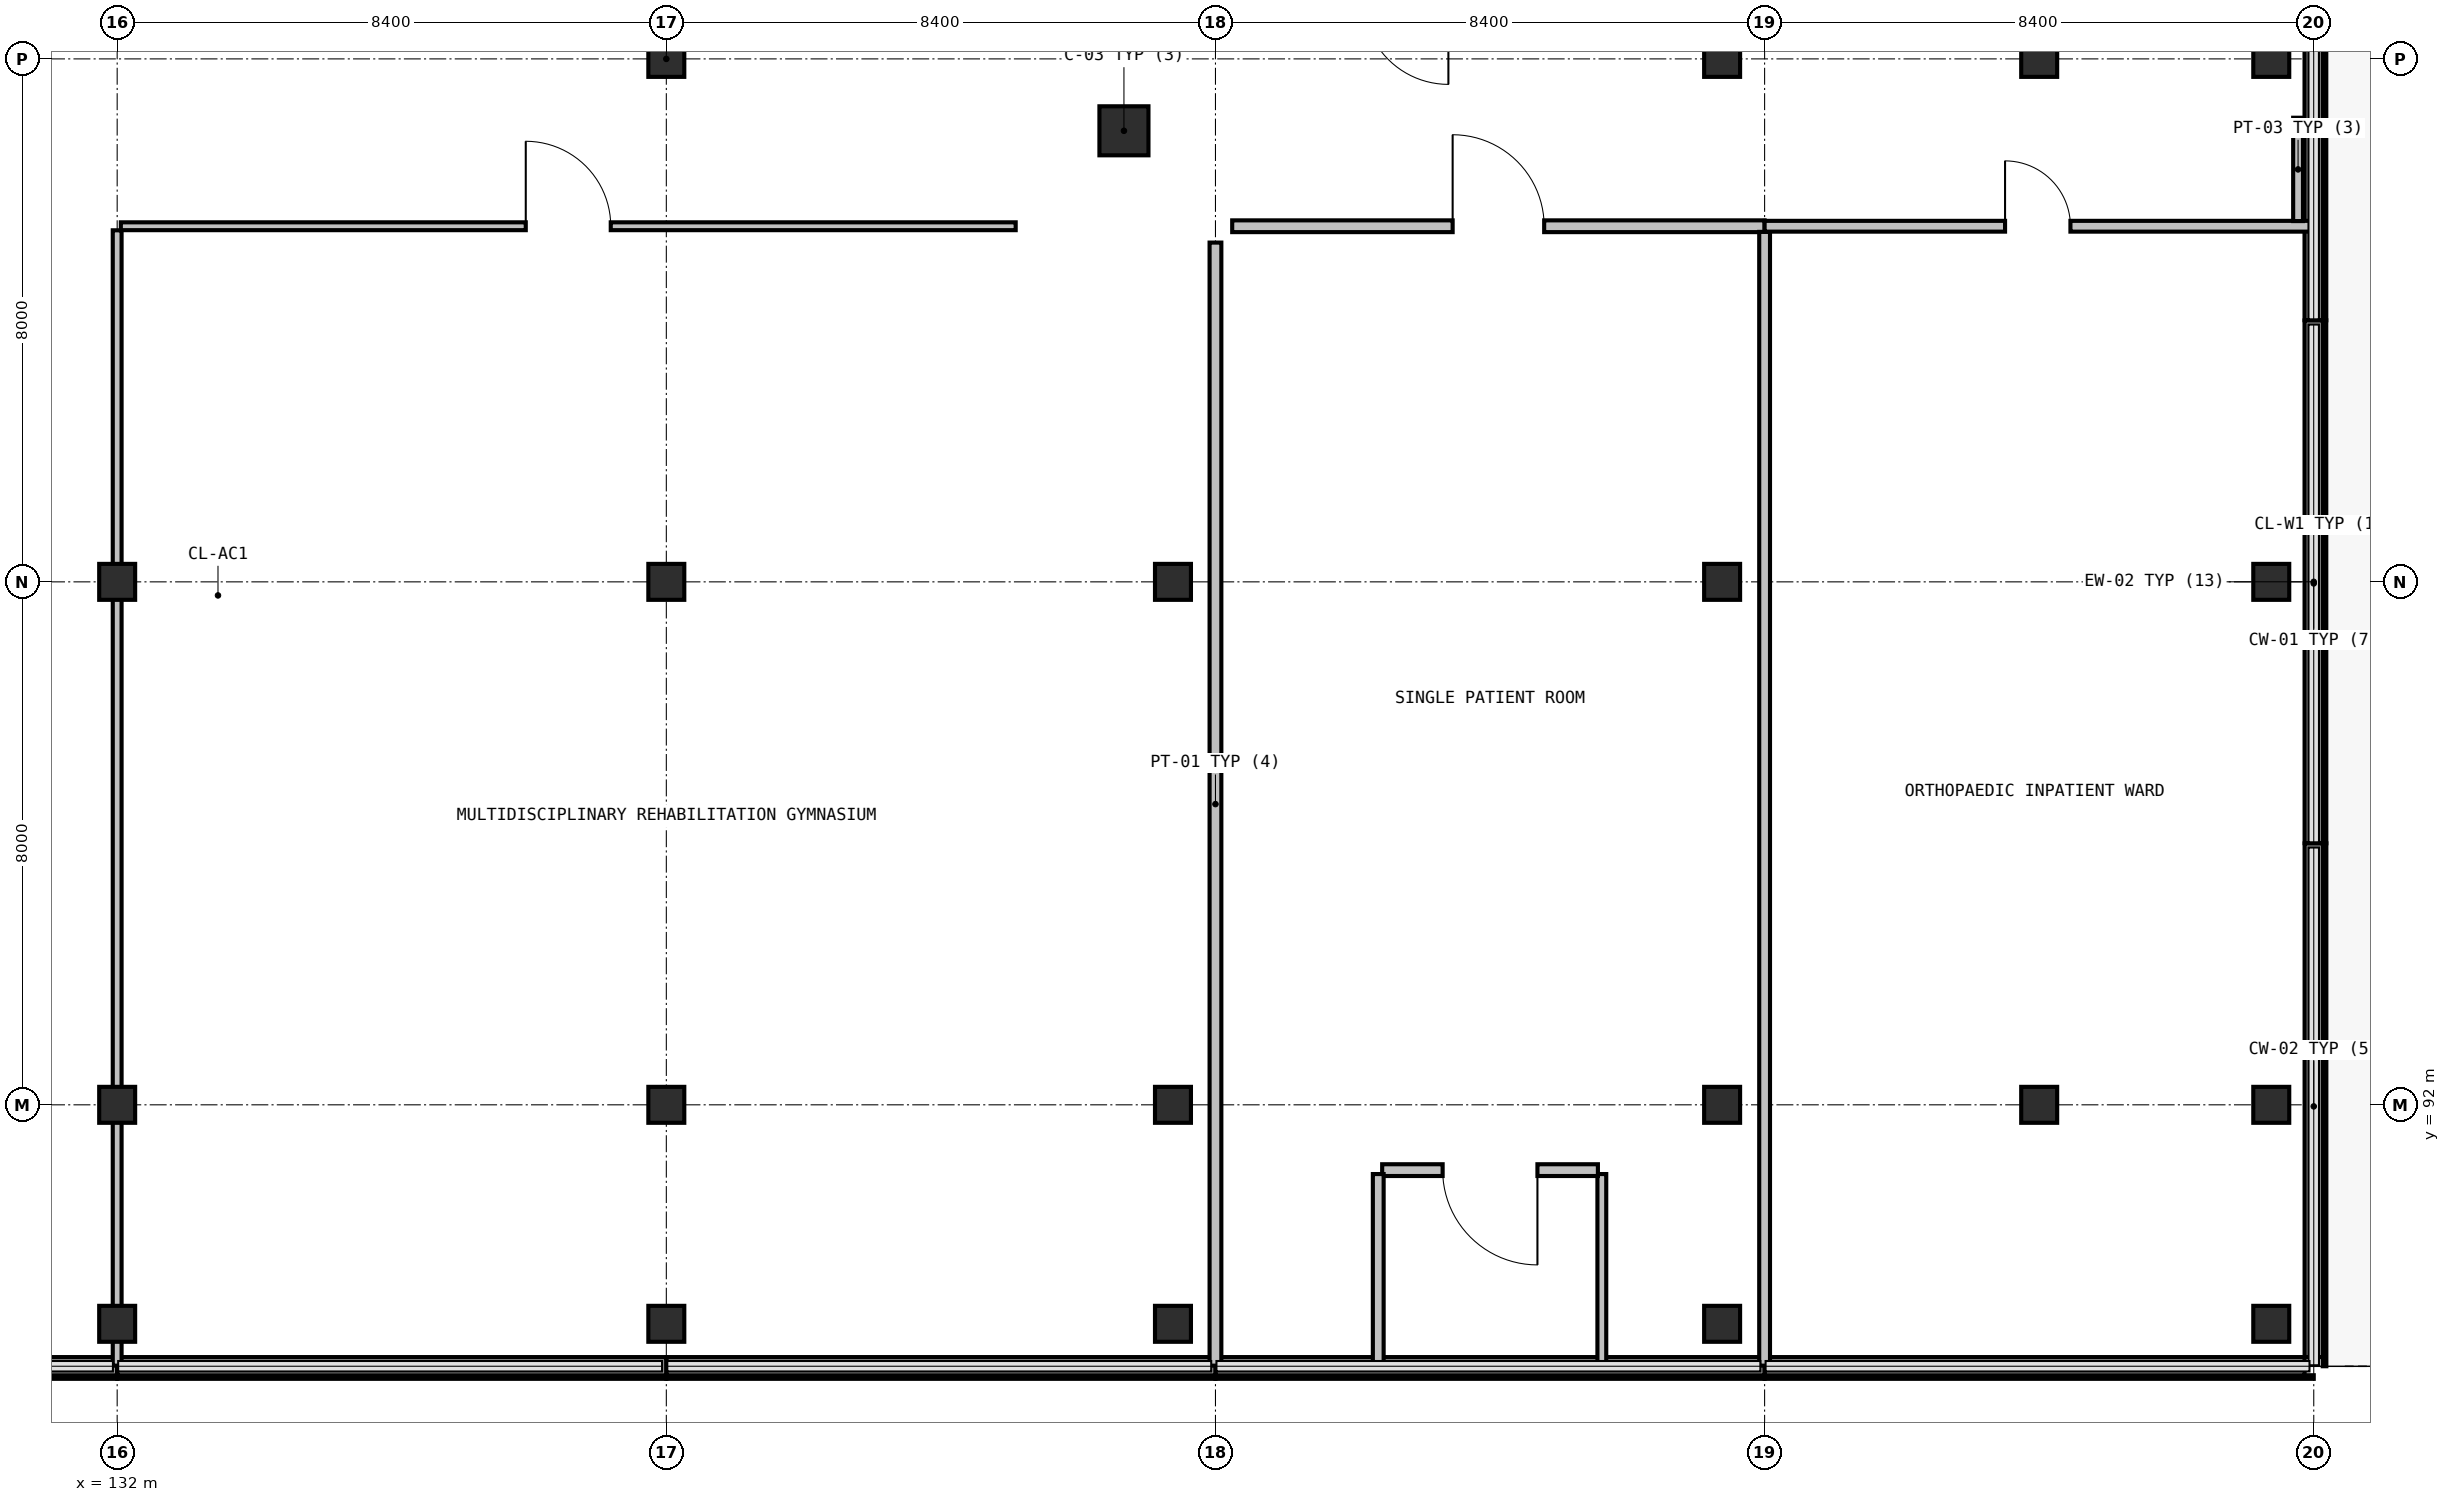
"""IFC4 building model, lengths in metres.
Left out: names, types, materials, properties, quantities, classifications, styles, units other than length and angle.
Written with IfcOpenShell. Run it as: python <this file> out.ifc"""

import sys

from ifc_helpers import new_model, si_unit, direction, frame, frame_2d, origin, origin_2d, place, context, subcontext, project, spatial, rectangle, extrude, element, fill, save


model = new_model("IFC4")
c1 = context("Model", 3, precision=1e-05, world=origin(), true_north=direction((0.0, 1.0)))
c2 = subcontext(c1, "Body", "Model", "MODEL_VIEW")
j1 = project(units=[si_unit("LENGTHUNIT", "METRE"), si_unit("PLANEANGLEUNIT", "RADIAN")], contexts=[c1])
p1 = place(None, origin())
s1 = spatial("IfcSite", under=j1, at=p1, CompositionType="ELEMENT")
p2 = place(p1, origin())
s2 = spatial("IfcBuilding", under=s1, at=p2, CompositionType="ELEMENT")
p3 = place(p2, frame((0.0, 0.0, 31.35)))
s3 = spatial("IfcBuildingStorey", under=s2, at=p3, CompositionType="ELEMENT", Elevation=31.35)
p4 = place(p3, frame((147.4, 106.9, 0.0), z_axis=(0.0, 0.0, 1.0), x_axis=(1.0, 0.0, 0.0)))
e1 = element("IfcColumn", 1, at=p4, inside=s3, PredefinedType="COLUMN", context=c2, shape_type="SweptSolid", body=[
    extrude(rectangle(XDim=0.75, YDim=0.75, at=origin_2d()), origin(), (0.0, 0.0, 1.0), 4.05),
])
for number, where, z_axis, x_axis in (
    (2, (161.4, 92.0, 0.0), (0.0, 0.0, 1.0), (1.0, 0.0, 0.0)),
    (3, (161.4, 108.0, 0.0), (0.0, 0.0, 1.0), (1.0, 0.0, 0.0)),
):
    element("IfcColumn", number, at=place(p3, frame(where, z_axis=z_axis, x_axis=x_axis)), inside=s3, PredefinedType="COLUMN", context=c2, shape_type="SweptSolid", body=[
        extrude(rectangle(XDim=0.55, YDim=0.55, at=origin_2d()), origin(), (0.0, 0.0, 1.0), 3.778),
    ])
for number, where, z_axis, x_axis in (
    (4, (132.0, 88.65, 0.0), (0.0, 0.0, 1.0), (1.0, 0.0, 0.0)),
    (5, (132.0, 92.0, 0.0), (0.0, 0.0, 1.0), (1.0, 0.0, 0.0)),
    (6, (132.0, 100.0, 0.0), (0.0, 0.0, 1.0), (1.0, 0.0, 0.0)),
    (7, (140.4, 88.65, 0.0), (0.0, 0.0, 1.0), (1.0, 0.0, 0.0)),
    (8, (140.4, 92.0, 0.0), (0.0, 0.0, 1.0), (1.0, 0.0, 0.0)),
    (9, (140.4, 100.0, 0.0), (0.0, 0.0, 1.0), (1.0, 0.0, 0.0)),
    (10, (140.4, 108.0, 0.0), (0.0, 0.0, 1.0), (1.0, 0.0, 0.0)),
    (11, (148.15, 88.65, 0.0), (0.0, 0.0, 1.0), (1.0, 0.0, 0.0)),
    (12, (148.15, 92.0, 0.0), (0.0, 0.0, 1.0), (1.0, 0.0, 0.0)),
    (13, (148.15, 100.0, 0.0), (0.0, 0.0, 1.0), (1.0, 0.0, 0.0)),
    (14, (156.55, 88.65, 0.0), (0.0, 0.0, 1.0), (1.0, 0.0, 0.0)),
    (15, (156.55, 92.0, 0.0), (0.0, 0.0, 1.0), (1.0, 0.0, 0.0)),
    (16, (156.55, 100.0, 0.0), (0.0, 0.0, 1.0), (1.0, 0.0, 0.0)),
    (17, (156.55, 108.0, 0.0), (0.0, 0.0, 1.0), (1.0, 0.0, 0.0)),
):
    element("IfcColumn", number, at=place(p3, frame(where, z_axis=z_axis, x_axis=x_axis)), inside=s3, PredefinedType="COLUMN", context=c2, shape_type="SweptSolid", body=[
        extrude(rectangle(XDim=0.55, YDim=0.55, at=origin_2d()), origin(), (0.0, 0.0, 1.0), 4.05),
    ])
for number, where, z_axis, x_axis in (
    (18, (164.95, 88.65, 0.0), (0.0, 0.0, 1.0), (1.0, 0.0, 0.0)),
    (19, (164.95, 92.0, 0.0), (0.0, 0.0, 1.0), (1.0, 0.0, 0.0)),
    (20, (164.95, 100.0, 0.0), (0.0, 0.0, 1.0), (1.0, 0.0, 0.0)),
    (21, (164.95, 108.0, 0.0), (0.0, 0.0, 1.0), (1.0, 0.0, 0.0)),
):
    element("IfcColumn", number, at=place(p3, frame(where, z_axis=z_axis, x_axis=x_axis)), inside=s3, PredefinedType="COLUMN", context=c2, shape_type="SweptSolid", body=[
        extrude(rectangle(XDim=0.55, YDim=0.55, at=origin_2d()), origin(), (0.0, 0.0, 1.0), 3.778),
    ])
p5 = place(p3, frame((165.599, 111.998, 0.0), z_axis=(0.0, 0.0, 1.0), x_axis=(0.0, -1.0, 0.0)))
e22 = element("IfcWall", 22, at=p5, inside=s3, PredefinedType="SOLIDWALL", context=c2, shape_type="SweptSolid", body=[
    extrude(rectangle(XDim=7.995, YDim=0.28, at=frame_2d((3.998, 0.0))), origin(), (0.0, 0.0, 1.0), 0.94),
])
p6 = place(p3, frame((165.599, 103.999, 0.0), z_axis=(0.0, 0.0, 1.0), x_axis=(0.000122129945, -0.999999992542, 0.0)))
e23 = element("IfcWall", 23, at=p6, inside=s3, PredefinedType="SOLIDWALL", context=c2, shape_type="SweptSolid", body=[
    extrude(rectangle(XDim=7.996, YDim=0.28, at=frame_2d((3.998, 0.0))), origin(), (0.0, 0.0, 1.0), 0.94),
])
p7 = place(p3, frame((165.6, 95.999, 0.0), z_axis=(0.0, 0.0, 1.0), x_axis=(0.0, -1.0, 0.0)))
e24 = element("IfcWall", 24, at=p7, inside=s3, PredefinedType="SOLIDWALL", context=c2, shape_type="SweptSolid", body=[
    extrude(rectangle(XDim=7.858, YDim=0.28, at=frame_2d((3.929, 0.0))), origin(), (0.0, 0.0, 1.0), 0.94),
])
p8 = place(p3, frame((165.46, 88.001, 0.0), z_axis=(0.0, 0.0, 1.0), x_axis=(-1.0, 0.0, 0.0)))
e25 = element("IfcWall", 25, at=p8, inside=s3, PredefinedType="SOLIDWALL", context=c2, shape_type="SweptSolid", body=[
    extrude(rectangle(XDim=8.258, YDim=0.28, at=frame_2d((4.129, 0.0))), origin(), (0.0, 0.0, 1.0), 0.94),
])
for number, where, z_axis, x_axis in (
    (26, (157.198, 88.001, 0.0), (0.0, 0.0, 1.0), (-1.0, 0.0, 0.0)),
    (27, (148.798, 88.001, 0.0), (0.0, 0.0, 1.0), (-1.0, 0.0, 0.0)),
    (28, (140.398, 88.001, 0.0), (0.0, 0.0, 1.0), (-1.0, 0.0, 0.0)),
    (29, (131.998, 88.001, 0.0), (0.0, 0.0, 1.0), (-1.0, 0.0, 0.0)),
):
    element("IfcWall", number, at=place(p3, frame(where, z_axis=z_axis, x_axis=x_axis)), inside=s3, PredefinedType="SOLIDWALL", context=c2, shape_type="SweptSolid", body=[
        extrude(rectangle(XDim=8.396, YDim=0.28, at=frame_2d((4.198, 0.0))), origin(), (0.0, 0.0, 1.0), 0.94),
    ])
p9 = place(p3, frame((132.0, 105.378, 0.0), z_axis=(0.0, 0.0, 1.0), x_axis=(0.0, -1.0, 0.0)))
e30 = element("IfcWall", 30, at=p9, inside=s3, PredefinedType="PARTITIONING", context=c2, shape_type="SweptSolid", body=[
    extrude(rectangle(XDim=17.368, YDim=0.135, at=frame_2d((8.684, 0.0))), origin(), (0.0, 0.0, 1.0), 3.185),
])
p10 = place(p3, frame((132.056, 105.44, 0.0), z_axis=(0.0, 0.0, 1.0), x_axis=(1.0, 0.0, 0.0)))
e31 = element("IfcWall", 31, at=p10, inside=s3, PredefinedType="PARTITIONING", context=c2, shape_type="SweptSolid", body=[
    extrude(rectangle(XDim=13.688, YDim=0.12, at=frame_2d((6.844, 0.0))), origin(), (0.0, 0.0, 1.0), 3.785),
])
p11 = place(p10, frame((6.194, 0.0, 0.0)))
e32 = element("IfcOpeningElement", 32, at=p11, cuts=e31, PredefinedType="OPENING", context=c2, shape_type="SweptSolid", body=[
    extrude(rectangle(XDim=1.3, YDim=2.15, at=frame_2d((0.65, 1.075))), frame((0.0, 0.07, 0.0), z_axis=(0.0, -1.0, 0.0), x_axis=(1.0, 0.0, 0.0)), (0.0, 0.0, 1.0), 0.14),
])
p12 = place(p3, frame((148.8, 105.19, 0.0), z_axis=(0.0, 0.0, 1.0), x_axis=(0.0, -1.0, 0.0)))
e33 = element("IfcWall", 33, at=p12, inside=s3, PredefinedType="PARTITIONING", context=c2, shape_type="SweptSolid", body=[
    extrude(rectangle(XDim=17.18, YDim=0.18, at=frame_2d((8.59, 0.0))), origin(), (0.0, 0.0, 1.0), 3.785),
])
p13 = place(p3, frame((149.056, 105.44, 0.0), z_axis=(0.0, 0.0, 1.0), x_axis=(1.0, 0.0, 0.0)))
e34 = element("IfcWall", 34, at=p13, inside=s3, PredefinedType="PARTITIONING", context=c2, shape_type="SweptSolid", body=[
    extrude(rectangle(XDim=8.144, YDim=0.18, at=frame_2d((4.072, 0.0))), origin(), (0.0, 0.0, 1.0), 3.785),
])
p14 = place(p13, frame((3.372, 0.0, 0.0)))
e35 = element("IfcOpeningElement", 35, at=p14, cuts=e34, PredefinedType="OPENING", context=c2, shape_type="SweptSolid", body=[
    extrude(rectangle(XDim=1.4, YDim=2.15, at=frame_2d((0.7, 1.075))), frame((0.0, 0.1, 0.0), z_axis=(0.0, -1.0, 0.0), x_axis=(1.0, 0.0, 0.0)), (0.0, 0.0, 1.0), 0.2),
])
p15 = place(p3, frame((157.2, 105.354, 0.0), z_axis=(0.0, 0.0, 1.0), x_axis=(0.0, -1.0, 0.0)))
e36 = element("IfcWall", 36, at=p15, inside=s3, PredefinedType="PARTITIONING", context=c2, shape_type="SweptSolid", body=[
    extrude(rectangle(XDim=17.344, YDim=0.165, at=frame_2d((8.672, 0.0))), origin(), (0.0, 0.0, 1.0), 3.785),
])
p16 = place(p3, frame((154.71, 88.043, 0.0), z_axis=(0.0, 0.0, 1.0), x_axis=(0.0, 1.0, 0.0)))
e37 = element("IfcWall", 37, at=p16, inside=s3, PredefinedType="PARTITIONING", context=c2, shape_type="SweptSolid", body=[
    extrude(rectangle(XDim=2.898, YDim=0.135, at=frame_2d((1.449, 0.0))), origin(), (0.0, 0.0, 1.0), 3.785),
])
p17 = place(p3, frame((154.65, 91.001, 0.0), z_axis=(0.0, 0.0, 1.0), x_axis=(-1.0, 0.0, 0.0)))
e38 = element("IfcWall", 38, at=p17, inside=s3, PredefinedType="PARTITIONING", context=c2, shape_type="SweptSolid", body=[
    extrude(rectangle(XDim=3.3, YDim=0.18, at=frame_2d((1.65, 0.0))), origin(), (0.0, 0.0, 1.0), 3.785),
])
p18 = place(p17, frame((0.925, 0.0, 0.0)))
e39 = element("IfcOpeningElement", 39, at=p18, cuts=e38, PredefinedType="OPENING", context=c2, shape_type="SweptSolid", body=[
    extrude(rectangle(XDim=1.45, YDim=2.15, at=frame_2d((0.725, 1.075))), frame((0.0, 0.1, 0.0), z_axis=(0.0, -1.0, 0.0), x_axis=(1.0, 0.0, 0.0)), (0.0, 0.0, 1.0), 0.2),
])
p19 = place(p3, frame((151.29, 90.941, 0.0), z_axis=(0.0, 0.0, 1.0), x_axis=(0.0, -1.0, 0.0)))
e40 = element("IfcWall", 40, at=p19, inside=s3, PredefinedType="PARTITIONING", context=c2, shape_type="SweptSolid", body=[
    extrude(rectangle(XDim=2.898, YDim=0.165, at=frame_2d((1.449, 0.0))), origin(), (0.0, 0.0, 1.0), 3.785),
])
p20 = place(p3, frame((157.2, 105.44, 0.0), z_axis=(0.0, 0.0, 1.0), x_axis=(1.0, 0.0, 0.0)))
e41 = element("IfcWall", 41, at=p20, inside=s3, PredefinedType="PARTITIONING", context=c2, shape_type="SweptSolid", body=[
    extrude(rectangle(XDim=8.357, YDim=0.165, at=frame_2d((4.178, 0.0))), origin(), (0.0, 0.0, 1.0), 3.785),
])
p21 = place(p20, frame((3.678, 0.0, 0.0)))
e42 = element("IfcOpeningElement", 42, at=p21, cuts=e41, PredefinedType="OPENING", context=c2, shape_type="SweptSolid", body=[
    extrude(rectangle(XDim=1.0, YDim=2.15, at=frame_2d((0.5, 1.075))), frame((0.0, 0.093, 0.0), z_axis=(0.0, -1.0, 0.0), x_axis=(1.0, 0.0, 0.0)), (0.0, 0.0, 1.0), 0.185),
])
p22 = place(p3, frame((165.36, 105.519, 0.0), z_axis=(0.0, 0.0, 1.0), x_axis=(0.0, 1.0, 0.0)))
e43 = element("IfcWall", 43, at=p22, inside=s3, PredefinedType="PARTITIONING", context=c2, shape_type="SweptSolid", body=[
    extrude(rectangle(XDim=1.581, YDim=0.15, at=frame_2d((0.791, 0.0))), origin(), (0.0, 0.0, 1.0), 3.785),
])
p23 = place(p11, origin())
e44 = element("IfcDoor", 44, at=p23, inside=s3, OperationType="SINGLE_SWING_RIGHT", PredefinedType="DOOR", context=c2, shape_type="SweptSolid", body=[
    extrude(rectangle(XDim=1.3, YDim=2.15, at=frame_2d((0.65, 1.075))), frame((0.0, 0.025, 0.0), z_axis=(0.0, -1.0, 0.0), x_axis=(1.0, 0.0, 0.0)), (0.0, 0.0, 1.0), 0.05),
])
fill(e32, e44)
p24 = place(p14, origin())
e45 = element("IfcDoor", 45, at=p24, inside=s3, OperationType="SINGLE_SWING_LEFT", PredefinedType="DOOR", context=c2, shape_type="SweptSolid", body=[
    extrude(rectangle(XDim=1.4, YDim=2.15, at=frame_2d((0.7, 1.075))), frame((0.0, 0.025, 0.0), z_axis=(0.0, -1.0, 0.0), x_axis=(1.0, 0.0, 0.0)), (0.0, 0.0, 1.0), 0.05),
])
fill(e35, e45)
p25 = place(p18, origin())
e46 = element("IfcDoor", 46, at=p25, inside=s3, OperationType="SINGLE_SWING_RIGHT", PredefinedType="DOOR", context=c2, shape_type="SweptSolid", body=[
    extrude(rectangle(XDim=1.45, YDim=2.15, at=frame_2d((0.725, 1.075))), frame((0.0, 0.025, 0.0), z_axis=(0.0, -1.0, 0.0), x_axis=(1.0, 0.0, 0.0)), (0.0, 0.0, 1.0), 0.05),
])
fill(e39, e46)
p26 = place(p21, origin())
e47 = element("IfcDoor", 47, at=p26, inside=s3, OperationType="SINGLE_SWING_LEFT", PredefinedType="DOOR", context=c2, shape_type="SweptSolid", body=[
    extrude(rectangle(XDim=1.0, YDim=2.15, at=frame_2d((0.5, 1.075))), frame((0.0, 0.025, 0.0), z_axis=(0.0, -1.0, 0.0), x_axis=(1.0, 0.0, 0.0)), (0.0, 0.0, 1.0), 0.05),
])
fill(e42, e47)
save(model, sys.argv[1])
